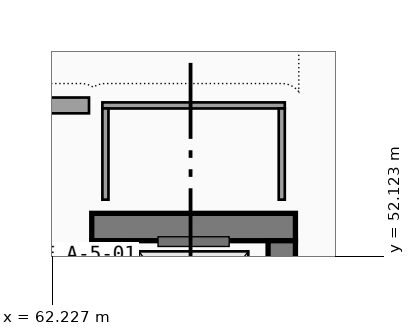
"""IFC4 building model, lengths in metres.
Left out: names, types, materials, properties, quantities, classifications, styles, units other than length and angle.
Written with IfcOpenShell. Run it as: python <this file> out.ifc"""

import sys

from ifc_helpers import new_model, si_unit, direction, frame, frame_2d, origin, place, context, subcontext, project, spatial, rectangle, extrude, element, save


model = new_model("IFC4")
c1 = context("Model", 3, precision=1e-05, world=origin(), true_north=direction((0.0, 1.0)))
c2 = subcontext(c1, "Body", "Model", "MODEL_VIEW")
j1 = project(units=[si_unit("LENGTHUNIT", "METRE"), si_unit("PLANEANGLEUNIT", "RADIAN")], contexts=[c1])
p1 = place(None, origin())
s1 = spatial("IfcSite", under=j1, at=p1, CompositionType="ELEMENT")
p2 = place(p1, origin())
s2 = spatial("IfcBuilding", under=s1, at=p2, CompositionType="ELEMENT")
p3 = place(p2, frame((0.0, 0.0, -4.8)))
s3 = spatial("IfcBuildingStorey", under=s2, at=p3, CompositionType="ELEMENT", Elevation=-4.8)
p4 = place(p3, frame((66.225, 52.6, 0.0), z_axis=(0.0, 0.0, 1.0), x_axis=(-1.0, 0.0, 0.0)))
e1 = element("IfcWall", 1, at=p4, inside=s3, PredefinedType="SHEAR", context=c2, shape_type="SweptSolid", body=[
    extrude(rectangle(XDim=3.35, YDim=0.45, at=frame_2d((1.675, 0.0))), origin(), (0.0, 0.0, 1.0), 4.5),
])
p5 = place(p3, frame((63.1, 52.375, 0.0), z_axis=(0.0, 0.0, 1.0), x_axis=(0.0, -1.0, 0.0)))
e2 = element("IfcWall", 2, at=p5, inside=s3, PredefinedType="SHEAR", context=c2, shape_type="SweptSolid", body=[
    extrude(rectangle(XDim=2.75, YDim=0.45, at=frame_2d((1.375, 0.0))), origin(), (0.0, 0.0, 1.0), 4.5),
])
p6 = place(p5, frame((0.725, 0.0, 0.0), z_axis=(0.0, 0.0, 1.0), x_axis=(1.0, 0.0, 0.0)))
e3 = element("IfcOpeningElement", 3, at=p6, cuts=e2, PredefinedType="OPENING", context=c2, shape_type="SweptSolid", body=[
    extrude(rectangle(XDim=1.3, YDim=2.25, at=frame_2d((0.65, 1.125))), frame((0.0, 0.235, 0.0), z_axis=(0.0, -1.0, 0.0), x_axis=(1.0, 0.0, 0.0)), (0.0, 0.0, 1.0), 0.47),
])
p7 = place(p3, frame((66.0, 49.625, 0.0), z_axis=(0.0, 0.0, 1.0), x_axis=(0.0, 1.0, 0.0)))
e4 = element("IfcWall", 4, at=p7, inside=s3, PredefinedType="SHEAR", context=c2, shape_type="SweptSolid", body=[
    extrude(rectangle(XDim=2.75, YDim=0.45, at=frame_2d((1.375, 0.0))), origin(), (0.0, 0.0, 1.0), 4.5),
])
p8 = place(p3, frame((66.05, 54.6, 0.0), z_axis=(0.0, 0.0, 1.0), x_axis=(-1.0, 0.0, 0.0)))
e5 = element("IfcWall", 5, at=p8, inside=s3, PredefinedType="PARTITIONING", context=c2, shape_type="SweptSolid", body=[
    extrude(rectangle(XDim=3.0, YDim=0.1, at=frame_2d((1.5, 0.0))), origin(), (0.0, 0.0, 1.0), 4.5),
])
for number, where, z_axis, x_axis in (
    (6, (63.1, 54.55, 0.0), (0.0, 0.0, 1.0), (0.0, -1.0, 0.0)),
    (7, (66.0, 53.05, 0.0), (0.0, 0.0, 1.0), (0.0, 1.0, 0.0)),
):
    element("IfcWall", number, at=place(p3, frame(where, z_axis=z_axis, x_axis=x_axis)), inside=s3, PredefinedType="PARTITIONING", context=c2, shape_type="SweptSolid", body=[
        extrude(rectangle(XDim=1.5, YDim=0.1, at=frame_2d((0.75, 0.0))), origin(), (0.0, 0.0, 1.0), 4.5),
    ])
p9 = place(p3, frame((62.83, 54.6, 0.0), z_axis=(0.0, 0.0, 1.0), x_axis=(-1.0, 0.0, 0.0)))
e8 = element("IfcWall", 8, at=p9, inside=s3, PredefinedType="SOLIDWALL", context=c2, shape_type="SweptSolid", body=[
    extrude(rectangle(XDim=3.76, YDim=0.26, at=frame_2d((1.88, 0.0))), origin(), (0.0, 0.0, 1.0), 4.5),
])
save(model, sys.argv[1])
